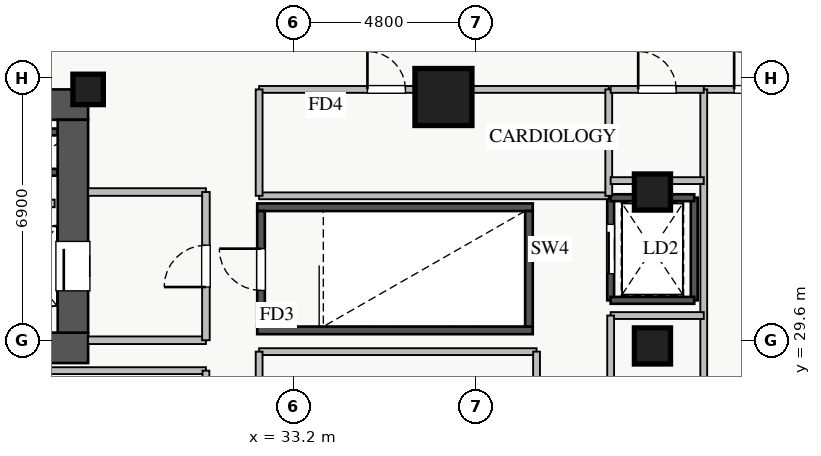
"""IFC4 building model, lengths in metres.
Left out: names, types, materials, properties, quantities, classifications, styles, units other than length and angle.
Written with IfcOpenShell. Run it as: python <this file> out.ifc"""

import sys

from ifc_helpers import new_model, si_unit, direction, frame, frame_2d, origin, origin_2d, place, context, subcontext, project, spatial, rectangle, extrude, source, transform, mapped, element, fill, save


model = new_model("IFC4")
c1 = context("Model", 3, precision=1e-05, world=origin(), true_north=direction((0.0, 1.0)))
c2 = subcontext(c1, "Body", "Model", "MODEL_VIEW")
j1 = project(units=[si_unit("LENGTHUNIT", "METRE"), si_unit("PLANEANGLEUNIT", "RADIAN")], contexts=[c1])
p1 = place(None, origin())
s1 = spatial("IfcSite", under=j1, at=p1, CompositionType="ELEMENT")
p2 = place(p1, origin())
s2 = spatial("IfcBuilding", under=s1, at=p2, CompositionType="ELEMENT")
p3 = place(p2, frame((0.0, 0.0, 18.2)))
s3 = spatial("IfcBuildingStorey", under=s2, at=p3, CompositionType="ELEMENT", Elevation=18.2)
for number, where, z_axis, x_axis in (
    (1, (25.8, 35.08, 0.0), (0.0, 0.0, 1.0), (1.0, 0.0, 0.0)),
    (2, (25.8, 34.02, 0.0), (0.0, 0.0, 1.0), (1.0, 0.0, 0.0)),
):
    element("IfcWall", number, at=place(p3, frame(where, z_axis=z_axis, x_axis=x_axis)), inside=s3, PredefinedType="SHEAR", context=c2, shape_type="SweptSolid", body=[
        extrude(rectangle(XDim=1.2, YDim=0.18, at=frame_2d((0.6, 0.0))), origin(), (0.0, 0.0, 1.0), 4.62),
    ])
p4 = place(p3, frame((41.55, 30.65, 0.0), z_axis=(0.0, 0.0, 1.0), x_axis=(0.0, 1.0, 0.0)))
e3 = element("IfcWall", 3, at=p4, inside=s3, PredefinedType="SHEAR", context=c2, shape_type="SweptSolid", body=[
    extrude(rectangle(XDim=2.7, YDim=0.18, at=frame_2d((1.35, 0.0))), origin(), (0.0, 0.0, 1.0), 4.62),
])
p5 = place(p4, frame((0.7, 0.0, 0.0)))
e4 = element("IfcOpeningElement", 4, at=p5, cuts=e3, PredefinedType="OPENING", context=c2, shape_type="SweptSolid", body=[
    extrude(rectangle(XDim=1.3, YDim=2.05, at=frame_2d((0.65, 1.025))), frame((0.0, 0.1, 0.0), z_axis=(0.0, -1.0, 0.0), x_axis=(1.0, 0.0, 0.0)), (0.0, 0.0, 1.0), 0.2),
])
p6 = place(p3, frame((43.75, 30.65, 0.0), z_axis=(0.0, 0.0, 1.0), x_axis=(0.0, 1.0, 0.0)))
e5 = element("IfcWall", 5, at=p6, inside=s3, PredefinedType="SHEAR", context=c2, shape_type="SweptSolid", body=[
    extrude(rectangle(XDim=2.7, YDim=0.18, at=frame_2d((1.35, 0.0))), origin(), (0.0, 0.0, 1.0), 4.62),
])
for number, where, z_axis, x_axis in (
    (6, (41.55, 30.65, 0.0), (0.0, 0.0, 1.0), (1.0, 0.0, 0.0)),
    (7, (41.55, 33.35, 0.0), (0.0, 0.0, 1.0), (1.0, 0.0, 0.0)),
):
    element("IfcWall", number, at=place(p3, frame(where, z_axis=z_axis, x_axis=x_axis)), inside=s3, PredefinedType="SHEAR", context=c2, shape_type="SweptSolid", body=[
        extrude(rectangle(XDim=2.2, YDim=0.18, at=frame_2d((1.1, 0.0))), origin(), (0.0, 0.0, 1.0), 4.62),
    ])
for number, where, z_axis, x_axis in (
    (8, (32.25, 29.86, 0.0), (0.0, 0.0, 1.0), (1.0, 0.0, 0.0)),
    (9, (32.25, 33.1, 0.0), (0.0, 0.0, 1.0), (1.0, 0.0, 0.0)),
):
    element("IfcWall", number, at=place(p3, frame(where, z_axis=z_axis, x_axis=x_axis)), inside=s3, PredefinedType="SHEAR", context=c2, shape_type="SweptSolid", body=[
        extrude(rectangle(XDim=7.25, YDim=0.2, at=frame_2d((3.625, 0.0))), origin(), (0.0, 0.0, 1.0), 4.8),
    ])
p7 = place(p3, frame((32.35, 29.96, 0.0), z_axis=(0.0, 0.0, 1.0), x_axis=(0.0, 1.0, 0.0)))
e10 = element("IfcWall", 10, at=p7, inside=s3, PredefinedType="SHEAR", context=c2, shape_type="SweptSolid", body=[
    extrude(rectangle(XDim=3.04, YDim=0.2, at=frame_2d((1.52, 0.0))), origin(), (0.0, 0.0, 1.0), 4.8),
])
p8 = place(p7, frame((0.95, 0.0, 0.0)))
e11 = element("IfcOpeningElement", 11, at=p8, cuts=e10, PredefinedType="OPENING", context=c2, shape_type="SweptSolid", body=[
    extrude(rectangle(XDim=1.1, YDim=2.05, at=frame_2d((0.55, 1.025))), frame((0.0, 0.11, 0.0), z_axis=(0.0, -1.0, 0.0), x_axis=(1.0, 0.0, 0.0)), (0.0, 0.0, 1.0), 0.22),
])
p9 = place(p3, frame((39.4, 29.96, 0.0), z_axis=(0.0, 0.0, 1.0), x_axis=(0.0, 1.0, 0.0)))
e12 = element("IfcWall", 12, at=p9, inside=s3, PredefinedType="SHEAR", context=c2, shape_type="SweptSolid", body=[
    extrude(rectangle(XDim=3.04, YDim=0.2, at=frame_2d((1.52, 0.0))), origin(), (0.0, 0.0, 1.0), 4.8),
])
p10 = place(p3, frame((10.2, 29.4, 0.0), z_axis=(0.0, 0.0, 1.0), x_axis=(1.0, 0.0, 0.0)))
e13 = element("IfcWall", 13, at=p10, inside=s3, PredefinedType="SHEAR", context=c2, shape_type="SweptSolid", body=[
    extrude(rectangle(XDim=17.6, YDim=0.8, at=frame_2d((8.8, 0.0))), origin(), (0.0, 0.0, 1.0), 4.8),
])
p11 = place(p3, frame((10.2, 35.8, 0.0), z_axis=(0.0, 0.0, 1.0), x_axis=(1.0, 0.0, 0.0)))
e14 = element("IfcWall", 14, at=p11, inside=s3, PredefinedType="SHEAR", context=c2, shape_type="SweptSolid", body=[
    extrude(rectangle(XDim=17.6, YDim=0.8, at=frame_2d((8.8, 0.0))), origin(), (0.0, 0.0, 1.0), 4.8),
])
p12 = place(p11, frame((1.15, 0.0, 0.0)))
e15 = element("IfcOpeningElement", 15, at=p12, cuts=e14, PredefinedType="OPENING", context=c2, shape_type="SweptSolid", body=[
    extrude(rectangle(XDim=1.1, YDim=2.05, at=frame_2d((0.55, 1.025))), frame((0.0, 0.41, 0.0), z_axis=(0.0, -1.0, 0.0), x_axis=(1.0, 0.0, 0.0)), (0.0, 0.0, 1.0), 0.82),
])
p13 = place(p11, frame((8.3, 0.0, 0.0)))
e16 = element("IfcOpeningElement", 16, at=p13, cuts=e14, PredefinedType="OPENING", context=c2, shape_type="SweptSolid", body=[
    extrude(rectangle(XDim=1.1, YDim=2.05, at=frame_2d((0.55, 1.025))), frame((0.0, 0.41, 0.0), z_axis=(0.0, -1.0, 0.0), x_axis=(1.0, 0.0, 0.0)), (0.0, 0.0, 1.0), 0.82),
])
p14 = place(p11, frame((10.05, 0.0, 0.0)))
e17 = element("IfcOpeningElement", 17, at=p14, cuts=e14, PredefinedType="OPENING", context=c2, shape_type="SweptSolid", body=[
    extrude(rectangle(XDim=1.1, YDim=2.05, at=frame_2d((0.55, 1.025))), frame((0.0, 0.41, 0.0), z_axis=(0.0, -1.0, 0.0), x_axis=(1.0, 0.0, 0.0)), (0.0, 0.0, 1.0), 0.82),
])
p15 = place(p11, frame((14.74, 0.0, 0.0)))
e18 = element("IfcOpeningElement", 18, at=p15, cuts=e14, PredefinedType="OPENING", context=c2, shape_type="SweptSolid", body=[
    extrude(rectangle(XDim=1.0, YDim=2.05, at=frame_2d((0.5, 1.025))), frame((0.0, 0.41, 0.0), z_axis=(0.0, -1.0, 0.0), x_axis=(1.0, 0.0, 0.0)), (0.0, 0.0, 1.0), 0.82),
])
p16 = place(p11, frame((11.835, 0.0, 0.0)))
e19 = element("IfcOpeningElement", 19, at=p16, cuts=e14, PredefinedType="OPENING", context=c2, shape_type="SweptSolid", body=[
    extrude(rectangle(XDim=1.0, YDim=2.05, at=frame_2d((0.5, 1.025))), frame((0.0, 0.41, 0.0), z_axis=(0.0, -1.0, 0.0), x_axis=(1.0, 0.0, 0.0)), (0.0, 0.0, 1.0), 0.82),
])
p17 = place(p11, frame((13.37, 0.0, 0.0)))
e20 = element("IfcOpeningElement", 20, at=p17, cuts=e14, PredefinedType="OPENING", context=c2, shape_type="SweptSolid", body=[
    extrude(rectangle(XDim=1.0, YDim=2.05, at=frame_2d((0.5, 1.025))), frame((0.0, 0.41, 0.0), z_axis=(0.0, -1.0, 0.0), x_axis=(1.0, 0.0, 0.0)), (0.0, 0.0, 1.0), 0.82),
])
p18 = place(p3, frame((27.4, 29.8, 0.0), z_axis=(0.0, 0.0, 1.0), x_axis=(0.0, 1.0, 0.0)))
e21 = element("IfcWall", 21, at=p18, inside=s3, PredefinedType="SHEAR", context=c2, shape_type="SweptSolid", body=[
    extrude(rectangle(XDim=5.6, YDim=0.8, at=frame_2d((2.8, 0.0))), origin(), (0.0, 0.0, 1.0), 4.8),
])
p19 = place(p18, frame((1.1, 0.0, 0.0)))
e22 = element("IfcOpeningElement", 22, at=p19, cuts=e21, PredefinedType="OPENING", context=c2, shape_type="SweptSolid", body=[
    extrude(rectangle(XDim=1.3, YDim=2.05, at=frame_2d((0.65, 1.025))), frame((0.0, 0.41, 0.0), z_axis=(0.0, -1.0, 0.0), x_axis=(1.0, 0.0, 0.0)), (0.0, 0.0, 1.0), 0.82),
])
m1 = source(origin(), c2, "Body", "SweptSolid", [
    extrude(rectangle(XDim=1.5, YDim=1.5, at=origin_2d()), origin(), (0.0, 0.0, 1.0), 4.8),
])
p20 = place(p3, frame((37.15, 36.0, 0.0), z_axis=(0.0, 0.0, 1.0), x_axis=(1.0, 0.0, 0.0)))
e23 = element("IfcColumn", 23, at=p20, inside=s3, PredefinedType="COLUMN", context=c2, shape_type="MappedRepresentation", body=[
    mapped(m1, transform((0.0, 0.0, 0.0), x_axis=(1.0, 0.0, 0.0), y_axis=(0.0, 1.0, 0.0), z_axis=(0.0, 0.0, 1.0), scale=1.0)),
])
m2 = source(origin(), c2, "Body", "SweptSolid", [
    extrude(rectangle(XDim=0.95, YDim=0.95, at=origin_2d()), origin(), (0.0, 0.0, 1.0), 4.8),
])
for number, where, z_axis, x_axis in (
    (24, (42.65, 29.45, 0.0), (0.0, 0.0, 1.0), (1.0, 0.0, 0.0)),
    (25, (42.65, 33.5, 0.0), (0.0, 0.0, 1.0), (1.0, 0.0, 0.0)),
):
    element("IfcColumn", number, at=place(p3, frame(where, z_axis=z_axis, x_axis=x_axis)), inside=s3, PredefinedType="COLUMN", context=c2, shape_type="MappedRepresentation", body=[
        mapped(m2, transform((0.0, 0.0, 0.0), x_axis=(1.0, 0.0, 0.0), y_axis=(0.0, 1.0, 0.0), z_axis=(0.0, 0.0, 1.0), scale=1.0)),
    ])
m3 = source(origin(), c2, "Body", "SweptSolid", [
    extrude(rectangle(XDim=0.8, YDim=0.8, at=origin_2d()), origin(), (0.0, 0.0, 1.0), 4.8),
])
p21 = place(p3, frame((27.8, 36.2, 0.0), z_axis=(0.0, 0.0, 1.0), x_axis=(1.0, 0.0, 0.0)))
e26 = element("IfcColumn", 26, at=p21, inside=s3, PredefinedType="PILASTER", context=c2, shape_type="MappedRepresentation", body=[
    mapped(m3, transform((0.0, 0.0, 0.0), x_axis=(1.0, 0.0, 0.0), y_axis=(0.0, 1.0, 0.0), z_axis=(0.0, 0.0, 1.0), scale=1.0)),
])
for number, where, z_axis, x_axis in (
    (27, (27.8, 29.6, 0.0), (0.0, 0.0, 1.0), (1.0, 0.0, 0.0)),
    (28, (27.8, 33.5, 0.0), (0.0, 0.0, 1.0), (1.0, 0.0, 0.0)),
):
    element("IfcWall", number, at=place(p3, frame(where, z_axis=z_axis, x_axis=x_axis)), inside=s3, PredefinedType="PARTITIONING", context=c2, shape_type="SweptSolid", body=[
        extrude(rectangle(XDim=3.1, YDim=0.2, at=frame_2d((1.55, 0.0))), origin(), (0.0, 0.0, 1.0), 3.915),
    ])
p22 = place(p3, frame((30.9, 29.6, 0.0), z_axis=(0.0, 0.0, 1.0), x_axis=(0.0, 1.0, 0.0)))
e29 = element("IfcWall", 29, at=p22, inside=s3, PredefinedType="PARTITIONING", context=c2, shape_type="SweptSolid", body=[
    extrude(rectangle(XDim=3.9, YDim=0.2, at=frame_2d((1.95, 0.0))), origin(), (0.0, 0.0, 1.0), 4.62),
])
p23 = place(p22, frame((1.4, 0.0, 0.0)))
e30 = element("IfcOpeningElement", 30, at=p23, cuts=e29, PredefinedType="OPENING", context=c2, shape_type="SweptSolid", body=[
    extrude(rectangle(XDim=1.1, YDim=2.05, at=frame_2d((0.55, 1.025))), frame((0.0, 0.11, 0.0), z_axis=(0.0, -1.0, 0.0), x_axis=(1.0, 0.0, 0.0)), (0.0, 0.0, 1.0), 0.22),
])
p24 = place(p3, frame((21.75, 33.2, 0.0), z_axis=(0.0, 0.0, 1.0), x_axis=(1.0, 0.0, 0.0)))
e31 = element("IfcWall", 31, at=p24, inside=s3, PredefinedType="PARTITIONING", context=c2, shape_type="SweptSolid", body=[
    extrude(rectangle(XDim=5.17, YDim=0.2, at=frame_2d((2.585, 0.0))), origin(), (0.0, 0.0, 1.0), 4.62),
])
p25 = place(p3, frame((25.3, 28.8, 0.0), z_axis=(0.0, 0.0, 1.0), x_axis=(1.0, 0.0, 0.0)))
e32 = element("IfcWall", 32, at=p25, inside=s3, PredefinedType="PARTITIONING", context=c2, shape_type="SweptSolid", body=[
    extrude(rectangle(XDim=5.6, YDim=0.18, at=frame_2d((2.8, 0.0))), origin(), (0.0, 0.0, 1.0), 4.62),
])
p26 = place(p3, frame((30.9, 17.2, 0.0), z_axis=(0.0, 0.0, 1.0), x_axis=(0.0, 1.0, 0.0)))
e33 = element("IfcWall", 33, at=p26, inside=s3, PredefinedType="PARTITIONING", context=c2, shape_type="SweptSolid", body=[
    extrude(rectangle(XDim=11.6, YDim=0.18, at=frame_2d((5.8, 0.0))), origin(), (0.0, 0.0, 1.0), 4.62),
])
p27 = place(p26, frame((5.3, 0.0, 0.0)))
e34 = element("IfcOpeningElement", 34, at=p27, cuts=e33, PredefinedType="OPENING", context=c2, shape_type="SweptSolid", body=[
    extrude(rectangle(XDim=1.0, YDim=2.05, at=frame_2d((0.5, 1.025))), frame((0.0, 0.1, 0.0), z_axis=(0.0, -1.0, 0.0), x_axis=(1.0, 0.0, 0.0)), (0.0, 0.0, 1.0), 0.2),
])
p28 = place(p3, frame((32.3, 29.3, 0.0), z_axis=(0.0, 0.0, 1.0), x_axis=(1.0, 0.0, 0.0)))
e35 = element("IfcWall", 35, at=p28, inside=s3, PredefinedType="PARTITIONING", context=c2, shape_type="SweptSolid", body=[
    extrude(rectangle(XDim=7.3, YDim=0.18, at=frame_2d((3.65, 0.0))), origin(), (0.0, 0.0, 1.0), 3.915),
])
p29 = place(p3, frame((32.3, 21.8, 0.0), z_axis=(0.0, 0.0, 1.0), x_axis=(0.0, 1.0, 0.0)))
e36 = element("IfcWall", 36, at=p29, inside=s3, PredefinedType="PARTITIONING", context=c2, shape_type="SweptSolid", body=[
    extrude(rectangle(XDim=7.5, YDim=0.18, at=frame_2d((3.75, 0.0))), origin(), (0.0, 0.0, 1.0), 4.62),
])
p30 = place(p3, frame((39.6, 21.8, 0.0), z_axis=(0.0, 0.0, 1.0), x_axis=(0.0, 1.0, 0.0)))
e37 = element("IfcWall", 37, at=p30, inside=s3, PredefinedType="PARTITIONING", context=c2, shape_type="SweptSolid", body=[
    extrude(rectangle(XDim=7.5, YDim=0.18, at=frame_2d((3.75, 0.0))), origin(), (0.0, 0.0, 1.0), 4.62),
])
p31 = place(p30, frame((3.25, 0.0, 0.0)))
e38 = element("IfcOpeningElement", 38, at=p31, cuts=e37, PredefinedType="OPENING", context=c2, shape_type="SweptSolid", body=[
    extrude(rectangle(XDim=1.0, YDim=2.05, at=frame_2d((0.5, 1.025))), frame((0.0, 0.1, 0.0), z_axis=(0.0, -1.0, 0.0), x_axis=(1.0, 0.0, 0.0)), (0.0, 0.0, 1.0), 0.2),
])
p32 = place(p3, frame((32.3, 33.4, 0.0), z_axis=(0.0, 0.0, 1.0), x_axis=(1.0, 0.0, 0.0)))
e39 = element("IfcWall", 39, at=p32, inside=s3, PredefinedType="PARTITIONING", context=c2, shape_type="SweptSolid", body=[
    extrude(rectangle(XDim=9.2, YDim=0.18, at=frame_2d((4.6, 0.0))), origin(), (0.0, 0.0, 1.0), 3.915),
])
p33 = place(p3, frame((32.3, 36.2, 0.0), z_axis=(0.0, 0.0, 1.0), x_axis=(1.0, 0.0, 0.0)))
e40 = element("IfcWall", 40, at=p33, inside=s3, PredefinedType="PARTITIONING", context=c2, shape_type="SweptSolid", body=[
    extrude(rectangle(XDim=9.2, YDim=0.18, at=frame_2d((4.6, 0.0))), origin(), (0.0, 0.0, 1.0), 4.62),
])
p34 = place(p33, frame((2.85, 0.0, 0.0)))
e41 = element("IfcOpeningElement", 41, at=p34, cuts=e40, PredefinedType="OPENING", context=c2, shape_type="SweptSolid", body=[
    extrude(rectangle(XDim=1.0, YDim=2.05, at=frame_2d((0.5, 1.025))), frame((0.0, 0.1, 0.0), z_axis=(0.0, -1.0, 0.0), x_axis=(1.0, 0.0, 0.0)), (0.0, 0.0, 1.0), 0.2),
])
for number, where, z_axis, x_axis in (
    (42, (32.3, 33.4, 0.0), (0.0, 0.0, 1.0), (0.0, 1.0, 0.0)),
    (43, (41.5, 33.4, 0.0), (0.0, 0.0, 1.0), (0.0, 1.0, 0.0)),
):
    element("IfcWall", number, at=place(p3, frame(where, z_axis=z_axis, x_axis=x_axis)), inside=s3, PredefinedType="PARTITIONING", context=c2, shape_type="SweptSolid", body=[
        extrude(rectangle(XDim=2.8, YDim=0.18, at=frame_2d((1.4, 0.0))), origin(), (0.0, 0.0, 1.0), 4.62),
    ])
p35 = place(p3, frame((44.0, 36.2, 0.0), z_axis=(0.0, 0.0, 1.0), x_axis=(1.0, 0.0, 0.0)))
e44 = element("IfcWall", 44, at=p35, inside=s3, PredefinedType="PARTITIONING", context=c2, shape_type="SweptSolid", body=[
    extrude(rectangle(XDim=2.6, YDim=0.18, at=frame_2d((1.3, 0.0))), origin(), (0.0, 0.0, 1.0), 4.62),
])
p36 = place(p35, frame((0.8, 0.0, 0.0)))
e45 = element("IfcOpeningElement", 45, at=p36, cuts=e44, PredefinedType="OPENING", context=c2, shape_type="SweptSolid", body=[
    extrude(rectangle(XDim=1.0, YDim=2.05, at=frame_2d((0.5, 1.025))), frame((0.0, 0.1, 0.0), z_axis=(0.0, -1.0, 0.0), x_axis=(1.0, 0.0, 0.0)), (0.0, 0.0, 1.0), 0.2),
])
p37 = place(p3, frame((44.0, 24.2, 0.0), z_axis=(0.0, 0.0, 1.0), x_axis=(0.0, 1.0, 0.0)))
e46 = element("IfcWall", 46, at=p37, inside=s3, PredefinedType="PARTITIONING", context=c2, shape_type="SweptSolid", body=[
    extrude(rectangle(XDim=12.0, YDim=0.18, at=frame_2d((6.0, 0.0))), origin(), (0.0, 0.0, 1.0), 4.62),
])
p38 = place(p3, frame((41.55, 30.25, 0.0), z_axis=(0.0, 0.0, 1.0), x_axis=(1.0, 0.0, 0.0)))
e47 = element("IfcWall", 47, at=p38, inside=s3, PredefinedType="PARTITIONING", context=c2, shape_type="SweptSolid", body=[
    extrude(rectangle(XDim=2.45, YDim=0.18, at=frame_2d((1.225, 0.0))), origin(), (0.0, 0.0, 1.0), 4.62),
])
p39 = place(p3, frame((41.55, 21.8, 0.0), z_axis=(0.0, 0.0, 1.0), x_axis=(0.0, 1.0, 0.0)))
e48 = element("IfcWall", 48, at=p39, inside=s3, PredefinedType="PARTITIONING", context=c2, shape_type="SweptSolid", body=[
    extrude(rectangle(XDim=8.45, YDim=0.18, at=frame_2d((4.225, 0.0))), origin(), (0.0, 0.0, 1.0), 4.62),
])
p40 = place(p39, frame((3.725, 0.0, 0.0)))
e49 = element("IfcOpeningElement", 49, at=p40, cuts=e48, PredefinedType="OPENING", context=c2, shape_type="SweptSolid", body=[
    extrude(rectangle(XDim=1.0, YDim=2.05, at=frame_2d((0.5, 1.025))), frame((0.0, 0.1, 0.0), z_axis=(0.0, -1.0, 0.0), x_axis=(1.0, 0.0, 0.0)), (0.0, 0.0, 1.0), 0.2),
])
p41 = place(p3, frame((41.55, 33.8, 0.0), z_axis=(0.0, 0.0, 1.0), x_axis=(1.0, 0.0, 0.0)))
e50 = element("IfcWall", 50, at=p41, inside=s3, PredefinedType="PARTITIONING", context=c2, shape_type="SweptSolid", body=[
    extrude(rectangle(XDim=2.45, YDim=0.18, at=frame_2d((1.225, 0.0))), origin(), (0.0, 0.0, 1.0), 3.915),
])
p42 = place(p3, frame((41.55, 36.2, 0.0), z_axis=(0.0, 0.0, 1.0), x_axis=(1.0, 0.0, 0.0)))
e51 = element("IfcWall", 51, at=p42, inside=s3, PredefinedType="PARTITIONING", context=c2, shape_type="SweptSolid", body=[
    extrude(rectangle(XDim=2.45, YDim=0.18, at=frame_2d((1.225, 0.0))), origin(), (0.0, 0.0, 1.0), 4.62),
])
p43 = place(p42, frame((0.725, 0.0, 0.0)))
e52 = element("IfcOpeningElement", 52, at=p43, cuts=e51, PredefinedType="OPENING", context=c2, shape_type="SweptSolid", body=[
    extrude(rectangle(XDim=1.0, YDim=2.05, at=frame_2d((0.5, 1.025))), frame((0.0, 0.1, 0.0), z_axis=(0.0, -1.0, 0.0), x_axis=(1.0, 0.0, 0.0)), (0.0, 0.0, 1.0), 0.2),
])
m4 = source(origin(), c2, "Body", "SweptSolid", [
    extrude(rectangle(XDim=1.3, YDim=2.05, at=frame_2d((0.65, 1.025))), frame((0.0, 0.025, 0.0), z_axis=(0.0, -1.0, 0.0), x_axis=(1.0, 0.0, 0.0)), (0.0, 0.0, 1.0), 0.05),
])
p44 = place(p19, origin())
e53 = element("IfcDoor", 53, at=p44, inside=s3, OperationType="SLIDING_TO_LEFT", PredefinedType="DOOR", context=c2, shape_type="MappedRepresentation", body=[
    mapped(m4, transform((0.0, 0.0, 0.0), x_axis=(1.0, 0.0, 0.0), y_axis=(0.0, 1.0, 0.0), z_axis=(0.0, 0.0, 1.0), scale=1.0)),
])
fill(e22, e53)
m5 = source(origin(), c2, "Body", "SweptSolid", [
    extrude(rectangle(XDim=1.1, YDim=2.05, at=frame_2d((0.55, 1.025))), frame((0.0, 0.025, 0.0), z_axis=(0.0, -1.0, 0.0), x_axis=(1.0, 0.0, 0.0)), (0.0, 0.0, 1.0), 0.05),
])
p45 = place(p8, origin())
e54 = element("IfcDoor", 54, at=p45, inside=s3, OperationType="SINGLE_SWING_RIGHT", PredefinedType="DOOR", context=c2, shape_type="MappedRepresentation", body=[
    mapped(m5, transform((0.0, 0.0, 0.0), x_axis=(1.0, 0.0, 0.0), y_axis=(0.0, 1.0, 0.0), z_axis=(0.0, 0.0, 1.0), scale=1.0)),
])
fill(e11, e54)
p46 = place(p5, origin())
e55 = element("IfcDoor", 55, at=p46, inside=s3, OperationType="SLIDING_TO_LEFT", PredefinedType="DOOR", context=c2, shape_type="MappedRepresentation", body=[
    mapped(m4, transform((0.0, 0.0, 0.0), x_axis=(1.0, 0.0, 0.0), y_axis=(0.0, 1.0, 0.0), z_axis=(0.0, 0.0, 1.0), scale=1.0)),
])
fill(e4, e55)
p47 = place(p23, origin())
e56 = element("IfcDoor", 56, at=p47, inside=s3, OperationType="SINGLE_SWING_LEFT", PredefinedType="DOOR", context=c2, shape_type="MappedRepresentation", body=[
    mapped(m5, transform((0.0, 0.0, 0.0), x_axis=(1.0, 0.0, 0.0), y_axis=(0.0, 1.0, 0.0), z_axis=(0.0, 0.0, 1.0), scale=1.0)),
])
fill(e30, e56)
m6 = source(origin(), c2, "Body", "SweptSolid", [
    extrude(rectangle(XDim=1.0, YDim=2.05, at=frame_2d((0.5, 1.025))), frame((0.0, 0.025, 0.0), z_axis=(0.0, -1.0, 0.0), x_axis=(1.0, 0.0, 0.0)), (0.0, 0.0, 1.0), 0.05),
])
p48 = place(p34, origin())
e57 = element("IfcDoor", 57, at=p48, inside=s3, OperationType="SINGLE_SWING_LEFT", PredefinedType="DOOR", context=c2, shape_type="MappedRepresentation", body=[
    mapped(m6, transform((0.0, 0.0, 0.0), x_axis=(1.0, 0.0, 0.0), y_axis=(0.0, 1.0, 0.0), z_axis=(0.0, 0.0, 1.0), scale=1.0)),
])
fill(e41, e57)
p49 = place(p36, origin())
e58 = element("IfcDoor", 58, at=p49, inside=s3, OperationType="SINGLE_SWING_LEFT", PredefinedType="DOOR", context=c2, shape_type="MappedRepresentation", body=[
    mapped(m6, transform((0.0, 0.0, 0.0), x_axis=(1.0, 0.0, 0.0), y_axis=(0.0, 1.0, 0.0), z_axis=(0.0, 0.0, 1.0), scale=1.0)),
])
fill(e45, e58)
p50 = place(p43, origin())
e59 = element("IfcDoor", 59, at=p50, inside=s3, OperationType="SINGLE_SWING_LEFT", PredefinedType="DOOR", context=c2, shape_type="MappedRepresentation", body=[
    mapped(m6, transform((0.0, 0.0, 0.0), x_axis=(1.0, 0.0, 0.0), y_axis=(0.0, 1.0, 0.0), z_axis=(0.0, 0.0, 1.0), scale=1.0)),
])
fill(e52, e59)
save(model, sys.argv[1])
